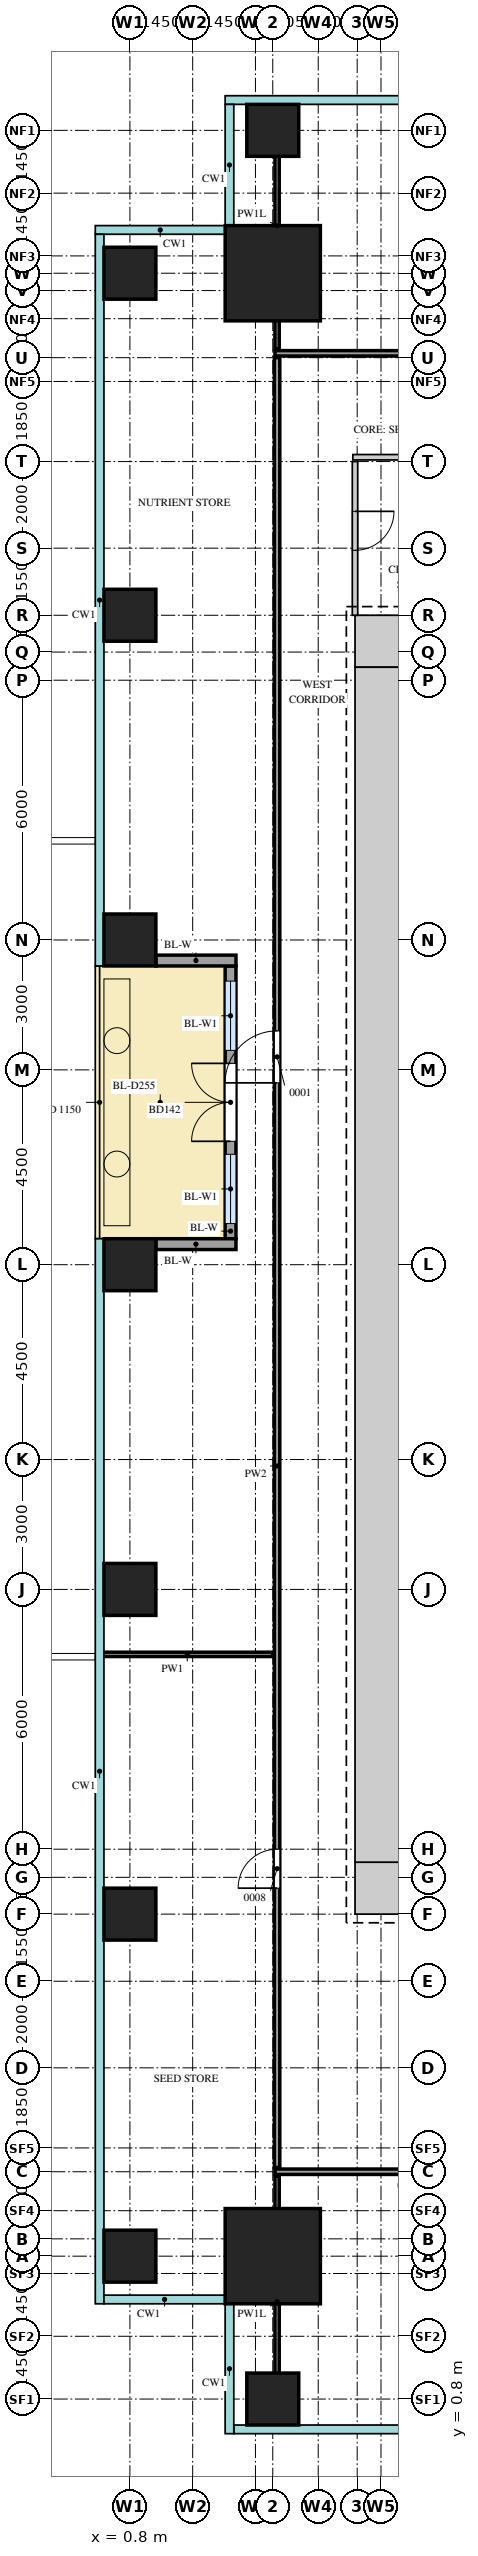
"""IFC4 building model, lengths in metres.
Left out: names, types, materials, properties, quantities, classifications, styles, units other than length and angle.
Written with IfcOpenShell. Run it as: python <this file> out.ifc"""

import sys

from ifc_helpers import new_model, si_unit, direction, frame, frame_2d, origin, origin_2d, place, context, subcontext, project, spatial, rectangle, extrude, source, transform, mapped, element, fill, save


model = new_model("IFC4")
c1 = context("Model", 3, precision=1e-05, world=origin(), true_north=direction((0.0, 1.0)))
c2 = subcontext(c1, "Body", "Model", "MODEL_VIEW")
j1 = project(units=[si_unit("LENGTHUNIT", "METRE"), si_unit("PLANEANGLEUNIT", "RADIAN")], contexts=[c1])
p1 = place(None, origin())
s1 = spatial("IfcSite", under=j1, at=p1, CompositionType="ELEMENT")
p2 = place(p1, origin())
s2 = spatial("IfcBuilding", under=s1, at=p2, CompositionType="ELEMENT")
p3 = place(p2, frame((0.0, 0.0, 69.0)))
s3 = spatial("IfcBuildingStorey", under=s2, at=p3, CompositionType="ELEMENT", Elevation=69.0)
m1 = source(origin(), c2, "Body", "SweptSolid", [
    extrude(rectangle(XDim=1.2, YDim=1.2, at=frame_2d((0.6, 0.0))), origin(), (0.0, 0.0, 1.0), 4.2),
])
for number, where, z_axis, x_axis in (
    (1, (6.0, 41.4, 0.0), (0.0, 0.0, 1.0), (1.0, 0.0, 0.0)),
    (2, (6.0, 12.6, 0.0), (0.0, 0.0, 1.0), (1.0, 0.0, 0.0)),
):
    element("IfcWall", number, at=place(p3, frame(where, z_axis=z_axis, x_axis=x_axis)), inside=s3, PredefinedType="SHEAR", context=c2, shape_type="MappedRepresentation", body=[
        mapped(m1, transform((0.0, 0.0, 0.0))),
    ])
m2 = source(origin(), c2, "Body", "SweptSolid", [
    extrude(rectangle(XDim=27.6, YDim=1.2, at=frame_2d((13.8, 0.0))), origin(), (0.0, 0.0, 1.0), 4.2),
])
p4 = place(p3, frame((6.6, 13.2, 0.0), z_axis=(0.0, 0.0, 1.0), x_axis=(0.0, 1.0, 0.0)))
e3 = element("IfcWall", 3, at=p4, inside=s3, PredefinedType="SHEAR", context=c2, shape_type="MappedRepresentation", body=[
    mapped(m2, transform((0.0, 0.0, 0.0))),
])
m3 = source(origin(), c2, "Body", "SweptSolid", [
    extrude(rectangle(XDim=2.2, YDim=2.2, at=origin_2d()), origin(), (0.0, 0.0, 1.0), 4.5),
])
for number, where, z_axis, x_axis in (
    (4, (4.1, 49.9, 0.0), (0.0, 0.0, 1.0), (1.0, 0.0, 0.0)),
    (5, (4.1, 4.1, 0.0), (0.0, 0.0, 1.0), (1.0, 0.0, 0.0)),
):
    element("IfcColumn", number, at=place(p3, frame(where, z_axis=z_axis, x_axis=x_axis)), inside=s3, PredefinedType="COLUMN", context=c2, shape_type="MappedRepresentation", body=[
        mapped(m3, transform((0.0, 0.0, 0.0))),
    ])
m4 = source(origin(), c2, "Body", "SweptSolid", [
    extrude(rectangle(XDim=1.2, YDim=1.2, at=origin_2d()), origin(), (0.0, 0.0, 1.0), 4.2),
])
for number, where, z_axis, x_axis in (
    (6, (4.1, 0.8, 0.0), (0.0, 0.0, 1.0), (1.0, 0.0, 0.0)),
    (7, (4.1, 53.2, 0.0), (0.0, 0.0, 1.0), (1.0, 0.0, 0.0)),
    (8, (0.8, 4.1, 0.0), (0.0, 0.0, 1.0), (1.0, 0.0, 0.0)),
    (9, (0.8, 12.0, 0.0), (0.0, 0.0, 1.0), (1.0, 0.0, 0.0)),
    (10, (0.8, 19.5, 0.0), (0.0, 0.0, 1.0), (1.0, 0.0, 0.0)),
    (11, (0.8, 27.0, 0.0), (0.0, 0.0, 1.0), (1.0, 0.0, 0.0)),
    (12, (0.8, 34.5, 0.0), (0.0, 0.0, 1.0), (1.0, 0.0, 0.0)),
    (13, (0.8, 42.0, 0.0), (0.0, 0.0, 1.0), (1.0, 0.0, 0.0)),
    (14, (0.8, 49.9, 0.0), (0.0, 0.0, 1.0), (1.0, 0.0, 0.0)),
):
    element("IfcColumn", number, at=place(p3, frame(where, z_axis=z_axis, x_axis=x_axis)), inside=s3, PredefinedType="COLUMN", context=c2, shape_type="MappedRepresentation", body=[
        mapped(m4, transform((0.0, 0.0, 0.0))),
    ])
m5 = source(origin(), c2, "Body", "SweptSolid", [
    extrude(rectangle(XDim=6.3, YDim=0.25, at=frame_2d((3.15, 0.0))), origin(), (0.0, 0.0, 1.0), 4.2),
])
p5 = place(p3, frame((3.125, 27.6, 0.0), z_axis=(0.0, 0.0, 1.0), x_axis=(0.0, 1.0, 0.0)))
e15 = element("IfcWall", 15, at=p5, inside=s3, PredefinedType="SOLIDWALL", context=c2, shape_type="MappedRepresentation", body=[
    mapped(m5, transform((0.0, 0.0, 0.0))),
])
m6 = source(origin(), c2, "Body", "SweptSolid", [
    extrude(rectangle(XDim=1.6, YDim=2.4, at=frame_2d((0.8, 1.2))), frame((0.0, 0.135, 0.0), z_axis=(0.0, -1.0, 0.0), x_axis=(1.0, 0.0, 0.0)), (0.0, 0.0, 1.0), 0.27),
])
p6 = place(p5, frame((0.35, 0.0, 0.0)))
e16 = element("IfcOpeningElement", 16, at=p6, cuts=e15, PredefinedType="OPENING", context=c2, shape_type="MappedRepresentation", body=[
    mapped(m6, transform((0.0, 0.0, 0.0))),
])
p7 = place(p5, frame((4.35, 0.0, 0.0)))
e17 = element("IfcOpeningElement", 17, at=p7, cuts=e15, PredefinedType="OPENING", context=c2, shape_type="MappedRepresentation", body=[
    mapped(m6, transform((0.0, 0.0, 0.0))),
])
m7 = source(origin(), c2, "Body", "SweptSolid", [
    extrude(rectangle(XDim=1.8, YDim=2.4, at=frame_2d((0.9, 1.2))), frame((0.0, 0.135, 0.0), z_axis=(0.0, -1.0, 0.0), x_axis=(1.0, 0.0, 0.0)), (0.0, 0.0, 1.0), 0.27),
])
p8 = place(p5, frame((2.25, 0.0, 0.0)))
e18 = element("IfcOpeningElement", 18, at=p8, cuts=e15, PredefinedType="OPENING", context=c2, shape_type="MappedRepresentation", body=[
    mapped(m7, transform((0.0, 0.0, 0.0))),
])
m8 = source(origin(), c2, "Body", "SweptSolid", [
    extrude(rectangle(XDim=1.85, YDim=0.25, at=frame_2d((0.925, 0.0))), origin(), (0.0, 0.0, 1.0), 4.2),
])
for number, where, z_axis, x_axis in (
    (19, (1.4, 27.475, 0.0), (0.0, 0.0, 1.0), (1.0, 0.0, 0.0)),
    (20, (1.4, 34.025, 0.0), (0.0, 0.0, 1.0), (1.0, 0.0, 0.0)),
):
    element("IfcWall", number, at=place(p3, frame(where, z_axis=z_axis, x_axis=x_axis)), inside=s3, PredefinedType="SOLIDWALL", context=c2, shape_type="MappedRepresentation", body=[
        mapped(m8, transform((0.0, 0.0, 0.0))),
    ])
m9 = source(origin(), c2, "Body", "SweptSolid", [
    extrude(rectangle(XDim=5.8, YDim=0.1, at=frame_2d((2.9, 0.0))), origin(), (0.0, 0.0, 1.0), 3.6),
])
p9 = place(p3, frame((4.2, 0.15, 0.0), z_axis=(0.0, 0.0, 1.0), x_axis=(0.0, 1.0, 0.0)))
e21 = element("IfcWall", 21, at=p9, inside=s3, PredefinedType="PARTITIONING", context=c2, shape_type="MappedRepresentation", body=[
    mapped(m9, transform((0.0, 0.0, 0.0))),
])
m10 = source(origin(), c2, "Body", "SweptSolid", [
    extrude(rectangle(XDim=22.3, YDim=0.125, at=frame_2d((11.15, 0.0))), origin(), (0.0, 0.0, 1.0), 4.3),
])
p10 = place(p3, frame((4.15, 6.05, 0.0), z_axis=(0.0, 0.0, 1.0), x_axis=(1.0, 0.0, 0.0)))
e22 = element("IfcWall", 22, at=p10, inside=s3, PredefinedType="PARTITIONING", context=c2, shape_type="MappedRepresentation", body=[
    mapped(m10, transform((0.0, 0.0, 0.0))),
])
m11 = source(origin(), c2, "Body", "SweptSolid", [
    extrude(rectangle(XDim=0.9, YDim=2.1, at=frame_2d((0.45, 1.05))), frame((0.0, 0.073, 0.0), z_axis=(0.0, -1.0, 0.0), x_axis=(1.0, 0.0, 0.0)), (0.0, 0.0, 1.0), 0.145),
])
p11 = place(p10, frame((3.5, 0.0, 0.0)))
e23 = element("IfcOpeningElement", 23, at=p11, cuts=e22, PredefinedType="OPENING", context=c2, shape_type="MappedRepresentation", body=[
    mapped(m11, transform((0.0, 0.0, 0.0))),
])
m12 = source(origin(), c2, "Body", "SweptSolid", [
    extrude(rectangle(XDim=1.2, YDim=2.1, at=frame_2d((0.6, 1.05))), frame((0.0, 0.073, 0.0), z_axis=(0.0, -1.0, 0.0), x_axis=(1.0, 0.0, 0.0)), (0.0, 0.0, 1.0), 0.145),
])
p12 = place(p10, frame((13.25, 0.0, 0.0)))
e24 = element("IfcOpeningElement", 24, at=p12, cuts=e22, PredefinedType="OPENING", context=c2, shape_type="MappedRepresentation", body=[
    mapped(m12, transform((0.0, 0.0, 0.0))),
])
m13 = source(origin(), c2, "Body", "SweptSolid", [
    extrude(rectangle(XDim=41.8, YDim=0.125, at=frame_2d((20.9, 0.0))), origin(), (0.0, 0.0, 1.0), 4.3),
])
p13 = place(p3, frame((4.2, 6.15, 0.0), z_axis=(0.0, 0.0, 1.0), x_axis=(0.0, 1.0, 0.0)))
e25 = element("IfcWall", 25, at=p13, inside=s3, PredefinedType="PARTITIONING", context=c2, shape_type="MappedRepresentation", body=[
    mapped(m13, transform((0.0, 0.0, 0.0))),
])
p14 = place(p13, frame((6.45, 0.0, 0.0)))
e26 = element("IfcOpeningElement", 26, at=p14, cuts=e25, PredefinedType="OPENING", context=c2, shape_type="MappedRepresentation", body=[
    mapped(m11, transform((0.0, 0.0, 0.0))),
])
p15 = place(p13, frame((25.05, 0.0, 0.0)))
e27 = element("IfcOpeningElement", 27, at=p15, cuts=e25, PredefinedType="OPENING", context=c2, shape_type="MappedRepresentation", body=[
    mapped(m12, transform((0.0, 0.0, 0.0))),
])
m14 = source(origin(), c2, "Body", "SweptSolid", [
    extrude(rectangle(XDim=3.95, YDim=0.1, at=frame_2d((1.975, 0.0))), origin(), (0.0, 0.0, 1.0), 4.3),
])
p16 = place(p3, frame((0.15, 18.0, 0.0), z_axis=(0.0, 0.0, 1.0), x_axis=(1.0, 0.0, 0.0)))
e28 = element("IfcWall", 28, at=p16, inside=s3, PredefinedType="PARTITIONING", context=c2, shape_type="MappedRepresentation", body=[
    mapped(m14, transform((0.0, 0.0, 0.0))),
])
m15 = source(origin(), c2, "Body", "SweptSolid", [
    extrude(rectangle(XDim=3.55, YDim=0.125, at=frame_2d((1.775, 0.0))), origin(), (0.0, 0.0, 1.0), 4.3),
])
p17 = place(p3, frame((6.0, 42.0, 0.0), z_axis=(0.0, 0.0, 1.0), x_axis=(0.0, 1.0, 0.0)))
e29 = element("IfcWall", 29, at=p17, inside=s3, PredefinedType="PARTITIONING", context=c2, shape_type="MappedRepresentation", body=[
    mapped(m15, transform((0.0, 0.0, 0.0))),
])
p18 = place(p17, frame((1.5, 0.0, 0.0)))
e30 = element("IfcOpeningElement", 30, at=p18, cuts=e29, PredefinedType="OPENING", context=c2, shape_type="MappedRepresentation", body=[
    mapped(m11, transform((0.0, 0.0, 0.0))),
])
m16 = source(origin(), c2, "Body", "SweptSolid", [
    extrude(rectangle(XDim=7.95, YDim=0.125, at=frame_2d((3.975, 0.0))), origin(), (0.0, 0.0, 1.0), 4.3),
])
p19 = place(p3, frame((5.95, 45.65, 0.0), z_axis=(0.0, 0.0, 1.0), x_axis=(1.0, 0.0, 0.0)))
e31 = element("IfcWall", 31, at=p19, inside=s3, PredefinedType="PARTITIONING", context=c2, shape_type="MappedRepresentation", body=[
    mapped(m16, transform((0.0, 0.0, 0.0))),
])
p20 = place(p19, frame((3.3, 0.0, 0.0)))
e32 = element("IfcOpeningElement", 32, at=p20, cuts=e31, PredefinedType="OPENING", context=c2, shape_type="MappedRepresentation", body=[
    mapped(m11, transform((0.0, 0.0, 0.0))),
])
p21 = place(p19, frame((6.1, 0.0, 0.0)))
e33 = element("IfcOpeningElement", 33, at=p21, cuts=e31, PredefinedType="OPENING", context=c2, shape_type="MappedRepresentation", body=[
    mapped(m11, transform((0.0, 0.0, 0.0))),
])
m17 = source(origin(), c2, "Body", "SweptSolid", [
    extrude(rectangle(XDim=26.6, YDim=0.125, at=frame_2d((13.3, 0.0))), origin(), (0.0, 0.0, 1.0), 4.3),
])
p22 = place(p3, frame((4.15, 48.05, 0.0), z_axis=(0.0, 0.0, 1.0), x_axis=(1.0, 0.0, 0.0)))
e34 = element("IfcWall", 34, at=p22, inside=s3, PredefinedType="PARTITIONING", context=c2, shape_type="MappedRepresentation", body=[
    mapped(m17, transform((0.0, 0.0, 0.0))),
])
p23 = place(p22, frame((7.25, 0.0, 0.0)))
e35 = element("IfcOpeningElement", 35, at=p23, cuts=e34, PredefinedType="OPENING", context=c2, shape_type="MappedRepresentation", body=[
    mapped(m11, transform((0.0, 0.0, 0.0))),
])
p24 = place(p22, frame((20.5, 0.0, 0.0)))
e36 = element("IfcOpeningElement", 36, at=p24, cuts=e34, PredefinedType="OPENING", context=c2, shape_type="MappedRepresentation", body=[
    mapped(m11, transform((0.0, 0.0, 0.0))),
])
m18 = source(origin(), c2, "Body", "SweptSolid", [
    extrude(rectangle(XDim=5.7, YDim=0.1, at=frame_2d((2.85, 0.0))), origin(), (0.0, 0.0, 1.0), 3.6),
])
p25 = place(p3, frame((4.2, 48.15, 0.0), z_axis=(0.0, 0.0, 1.0), x_axis=(0.0, 1.0, 0.0)))
e37 = element("IfcWall", 37, at=p25, inside=s3, PredefinedType="PARTITIONING", context=c2, shape_type="MappedRepresentation", body=[
    mapped(m18, transform((0.0, 0.0, 0.0))),
])
m19 = source(origin(), c2, "Body", "SweptSolid", [
    extrude(rectangle(XDim=1.6, YDim=2.4, at=frame_2d((0.8, 1.2))), frame((0.0, 0.03, 0.0), z_axis=(0.0, -1.0, 0.0), x_axis=(1.0, 0.0, 0.0)), (0.0, 0.0, 1.0), 0.06),
])
p26 = place(p6, origin())
e38 = element("IfcWindow", 38, at=p26, inside=s3, PartitioningType="SINGLE_PANEL", PredefinedType="WINDOW", context=c2, shape_type="MappedRepresentation", body=[
    mapped(m19, transform((0.0, 0.0, 0.0))),
])
fill(e16, e38)
p27 = place(p7, origin())
e39 = element("IfcWindow", 39, at=p27, inside=s3, PartitioningType="SINGLE_PANEL", PredefinedType="WINDOW", context=c2, shape_type="MappedRepresentation", body=[
    mapped(m19, transform((0.0, 0.0, 0.0))),
])
fill(e17, e39)
m20 = source(origin(), c2, "Body", "SweptSolid", [
    extrude(rectangle(XDim=1.8, YDim=2.4, at=frame_2d((0.9, 1.2))), frame((0.0, 0.025, 0.0), z_axis=(0.0, -1.0, 0.0), x_axis=(1.0, 0.0, 0.0)), (0.0, 0.0, 1.0), 0.05),
])
p28 = place(p8, origin())
e40 = element("IfcDoor", 40, at=p28, inside=s3, OperationType="DOUBLE_DOOR_DOUBLE_SWING", PredefinedType="DOOR", context=c2, shape_type="MappedRepresentation", body=[
    mapped(m20, transform((0.0, 0.0, 0.0))),
])
fill(e18, e40)
m21 = source(origin(), c2, "Body", "SweptSolid", [
    extrude(rectangle(XDim=0.9, YDim=2.1, at=frame_2d((0.45, 1.05))), frame((0.0, 0.025, 0.0), z_axis=(0.0, -1.0, 0.0), x_axis=(1.0, 0.0, 0.0)), (0.0, 0.0, 1.0), 0.05),
])
p29 = place(p18, origin())
e41 = element("IfcDoor", 41, at=p29, inside=s3, OperationType="SINGLE_SWING_RIGHT", PredefinedType="DOOR", context=c2, shape_type="MappedRepresentation", body=[
    mapped(m21, transform((0.0, 0.0, 0.0))),
])
fill(e30, e41)
p30 = place(p14, origin())
e42 = element("IfcDoor", 42, at=p30, inside=s3, OperationType="SINGLE_SWING_RIGHT", PredefinedType="DOOR", context=c2, shape_type="MappedRepresentation", body=[
    mapped(m21, transform((0.0, 0.0, 0.0))),
])
fill(e26, e42)
m22 = source(origin(), c2, "Body", "SweptSolid", [
    extrude(rectangle(XDim=1.2, YDim=2.1, at=frame_2d((0.6, 1.05))), frame((0.0, 0.025, 0.0), z_axis=(0.0, -1.0, 0.0), x_axis=(1.0, 0.0, 0.0)), (0.0, 0.0, 1.0), 0.05),
])
p31 = place(p15, origin())
e43 = element("IfcDoor", 43, at=p31, inside=s3, OperationType="SINGLE_SWING_RIGHT", PredefinedType="DOOR", context=c2, shape_type="MappedRepresentation", body=[
    mapped(m22, transform((0.0, 0.0, 0.0))),
])
fill(e27, e43)
save(model, sys.argv[1])
